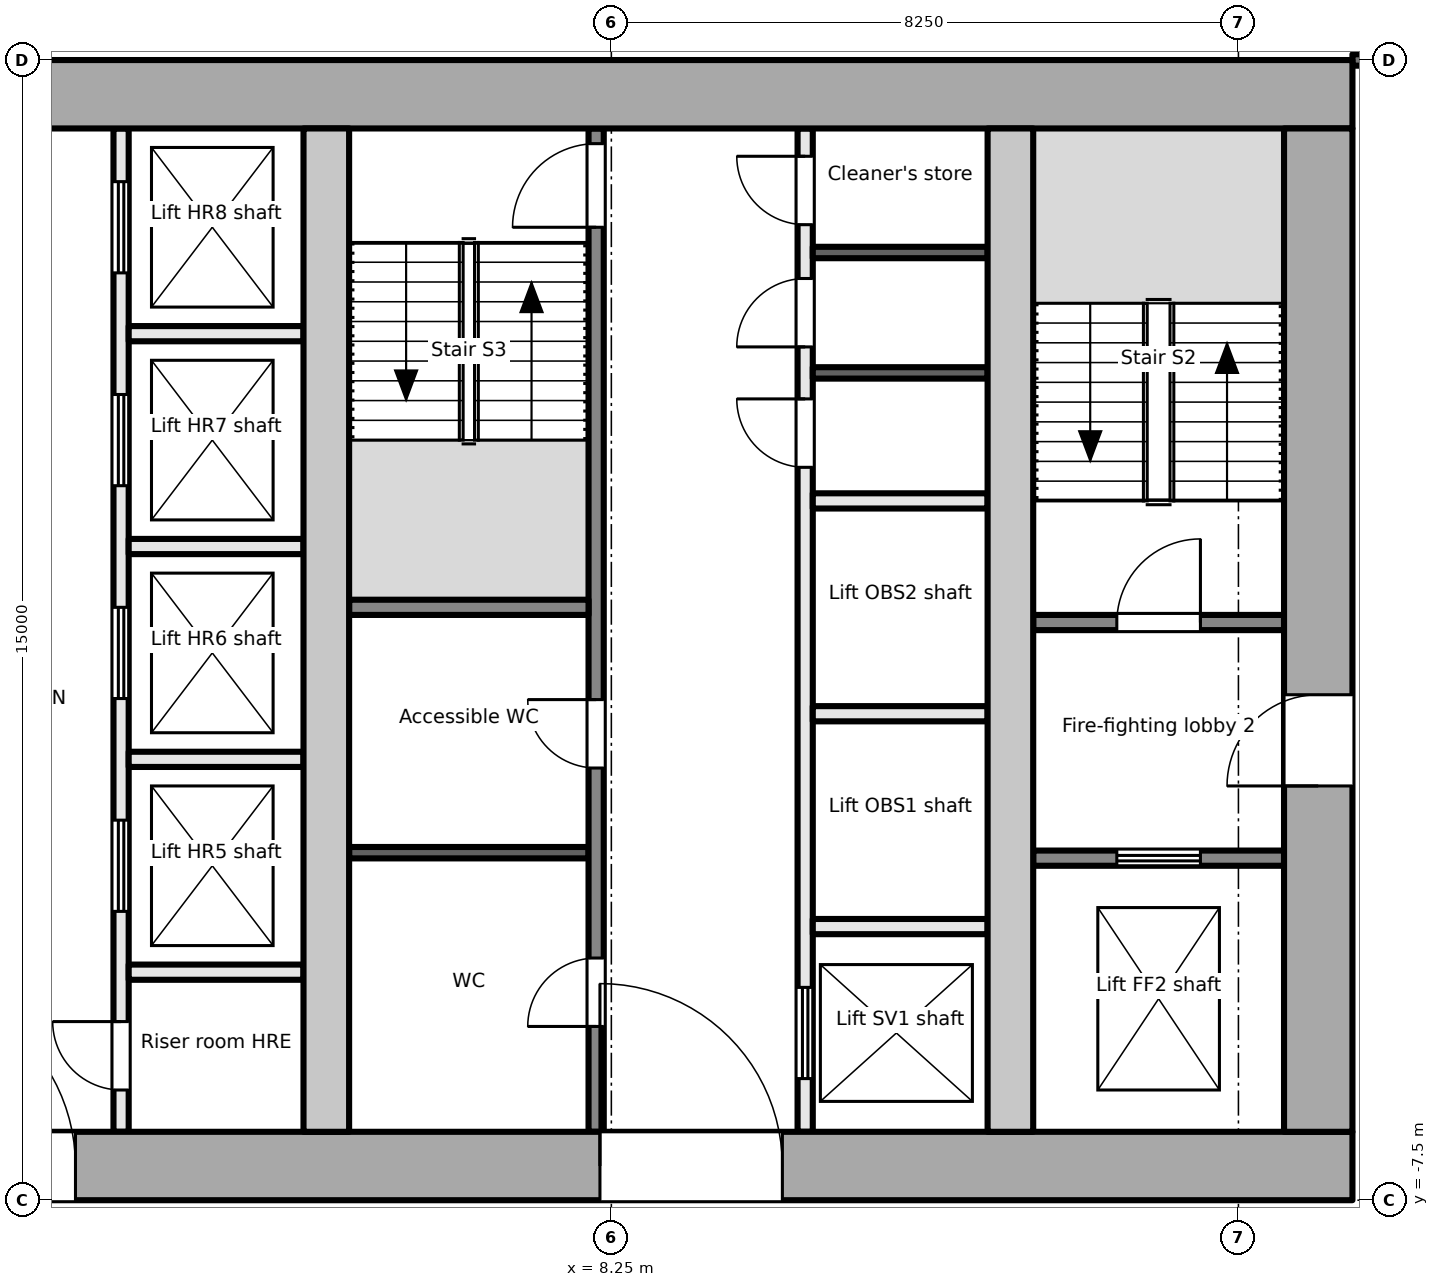
"""IFC4 building model, lengths in metres.
Left out: names, types, materials, properties, quantities, classifications, styles, units other than length and angle.
Written with IfcOpenShell. Run it as: python <this file> out.ifc"""

import sys

from ifc_helpers import new_model, si_unit, direction, frame, frame_2d, origin, place, context, subcontext, project, spatial, rectangle, extrude, element, fill, save


model = new_model("IFC4")
c1 = context("Model", 3, precision=1e-05, world=origin(), true_north=direction((0.0, 1.0)))
c2 = subcontext(c1, "Body", "Model", "MODEL_VIEW")
j1 = project(units=[si_unit("LENGTHUNIT", "METRE"), si_unit("PLANEANGLEUNIT", "RADIAN")], contexts=[c1])
p1 = place(None, origin())
s1 = spatial("IfcSite", under=j1, at=p1, CompositionType="ELEMENT")
p2 = place(p1, origin())
s2 = spatial("IfcBuilding", under=s1, at=p2, CompositionType="ELEMENT")
p3 = place(p2, frame((0.0, 0.0, 184.1)))
s3 = spatial("IfcBuildingStorey", under=s2, at=p3, CompositionType="ELEMENT", Elevation=184.1)
p4 = place(p3, frame((-18.0, -7.05, -0.2), z_axis=(0.0, 0.0, 1.0), x_axis=(1.0, 0.0, 0.0)))
e1 = element("IfcWall", 1, at=p4, inside=s3, PredefinedType="SHEAR", context=c2, shape_type="SweptSolid", body=[
    extrude(rectangle(XDim=36.0, YDim=0.9, at=frame_2d((18.0, 0.0))), origin(), (0.0, 0.0, 1.0), 3.9),
])
p5 = place(p4, frame((11.3, 0.0, 0.2)))
e2 = element("IfcOpeningElement", 2, at=p5, cuts=e1, PredefinedType="OPENING", context=c2, shape_type="SweptSolid", body=[
    extrude(rectangle(XDim=1.8, YDim=2.1, at=frame_2d((0.9, 1.05))), frame((0.0, 0.46, 0.0), z_axis=(0.0, -1.0, 0.0), x_axis=(1.0, 0.0, 0.0)), (0.0, 0.0, 1.0), 0.921),
])
p6 = place(p4, frame((16.8, 0.0, 0.2)))
e3 = element("IfcOpeningElement", 3, at=p6, cuts=e1, PredefinedType="OPENING", context=c2, shape_type="SweptSolid", body=[
    extrude(rectangle(XDim=2.4, YDim=2.1, at=frame_2d((1.2, 1.05))), frame((0.0, 0.46, 0.0), z_axis=(0.0, -1.0, 0.0), x_axis=(1.0, 0.0, 0.0)), (0.0, 0.0, 1.0), 0.921),
])
p7 = place(p4, frame((26.1, 0.0, 0.2)))
e4 = element("IfcOpeningElement", 4, at=p7, cuts=e1, PredefinedType="OPENING", context=c2, shape_type="SweptSolid", body=[
    extrude(rectangle(XDim=2.4, YDim=2.1, at=frame_2d((1.2, 1.05))), frame((0.0, 0.46, 0.0), z_axis=(0.0, -1.0, 0.0), x_axis=(1.0, 0.0, 0.0)), (0.0, 0.0, 1.0), 0.921),
])
p8 = place(p3, frame((-18.0, 7.05, -0.2), z_axis=(0.0, 0.0, 1.0), x_axis=(1.0, 0.0, 0.0)))
e5 = element("IfcWall", 5, at=p8, inside=s3, PredefinedType="SHEAR", context=c2, shape_type="SweptSolid", body=[
    extrude(rectangle(XDim=36.0, YDim=0.9, at=frame_2d((18.0, 0.0))), origin(), (0.0, 0.0, 1.0), 3.9),
])
p9 = place(p3, frame((17.55, -6.6, -0.2), z_axis=(0.0, 0.0, 1.0), x_axis=(0.0, 1.0, 0.0)))
e6 = element("IfcWall", 6, at=p9, inside=s3, PredefinedType="SHEAR", context=c2, shape_type="SweptSolid", body=[
    extrude(rectangle(XDim=13.2, YDim=0.9, at=frame_2d((6.6, 0.0))), origin(), (0.0, 0.0, 1.0), 3.9),
])
p10 = place(p9, frame((4.55, 0.0, 0.2)))
e7 = element("IfcOpeningElement", 7, at=p10, cuts=e6, PredefinedType="OPENING", context=c2, shape_type="SweptSolid", body=[
    extrude(rectangle(XDim=1.2, YDim=2.1, at=frame_2d((0.6, 1.05))), frame((0.0, 0.46, 0.0), z_axis=(0.0, -1.0, 0.0), x_axis=(1.0, 0.0, 0.0)), (0.0, 0.0, 1.0), 0.921),
])
for number, where, z_axis, x_axis in (
    (8, (4.5, -6.6, -0.2), (0.0, 0.0, 1.0), (0.0, 1.0, 0.0)),
    (9, (13.5, -6.6, -0.2), (0.0, 0.0, 1.0), (0.0, 1.0, 0.0)),
):
    element("IfcWall", number, at=place(p3, frame(where, z_axis=z_axis, x_axis=x_axis)), inside=s3, PredefinedType="SHEAR", context=c2, shape_type="SweptSolid", body=[
        extrude(rectangle(XDim=13.2, YDim=0.6, at=frame_2d((6.6, 0.0))), origin(), (0.0, 0.0, 1.0), 3.9),
    ])
p11 = place(p3, frame((13.8, -3.0, 0.0), z_axis=(0.0, 0.0, 1.0), x_axis=(1.0, 0.0, 0.0)))
e10 = element("IfcWall", 10, at=p11, inside=s3, PredefinedType="PARTITIONING", context=c2, shape_type="SweptSolid", body=[
    extrude(rectangle(XDim=3.3, YDim=0.2, at=frame_2d((1.65, 0.0))), origin(), (0.0, 0.0, 1.0), 3.7),
])
p12 = place(p11, frame((1.1, 0.0, 0.0)))
e11 = element("IfcOpeningElement", 11, at=p12, cuts=e10, PredefinedType="OPENING", context=c2, shape_type="SweptSolid", body=[
    extrude(rectangle(XDim=1.1, YDim=2.1, at=frame_2d((0.55, 1.05))), frame((0.0, 0.111, 0.0), z_axis=(0.0, -1.0, 0.0), x_axis=(1.0, 0.0, 0.0)), (0.0, 0.0, 1.0), 0.221),
])
p13 = place(p3, frame((13.8, 0.1, 0.0), z_axis=(0.0, 0.0, 1.0), x_axis=(1.0, 0.0, 0.0)))
e12 = element("IfcWall", 12, at=p13, inside=s3, PredefinedType="PARTITIONING", context=c2, shape_type="SweptSolid", body=[
    extrude(rectangle(XDim=3.3, YDim=0.2, at=frame_2d((1.65, 0.0))), origin(), (0.0, 0.0, 1.0), 3.7),
])
p14 = place(p13, frame((1.1, 0.0, 0.0)))
e13 = element("IfcOpeningElement", 13, at=p14, cuts=e12, PredefinedType="OPENING", context=c2, shape_type="SweptSolid", body=[
    extrude(rectangle(XDim=1.1, YDim=2.1, at=frame_2d((0.55, 1.05))), frame((0.0, 0.111, 0.0), z_axis=(0.0, -1.0, 0.0), x_axis=(1.0, 0.0, 0.0)), (0.0, 0.0, 1.0), 0.221),
])
p15 = place(p3, frame((1.8, -6.6, 0.0), z_axis=(0.0, 0.0, 1.0), x_axis=(0.0, 1.0, 0.0)))
e14 = element("IfcWall", 14, at=p15, inside=s3, PredefinedType="PARTITIONING", context=c2, shape_type="SweptSolid", body=[
    extrude(rectangle(XDim=13.2, YDim=0.2, at=frame_2d((6.6, 0.0))), origin(), (0.0, 0.0, 1.0), 3.7),
])
p16 = place(p15, frame((0.55, 0.0, 0.0)))
e15 = element("IfcOpeningElement", 15, at=p16, cuts=e14, PredefinedType="OPENING", context=c2, shape_type="SweptSolid", body=[
    extrude(rectangle(XDim=0.9, YDim=2.1, at=frame_2d((0.45, 1.05))), frame((0.0, 0.111, 0.0), z_axis=(0.0, -1.0, 0.0), x_axis=(1.0, 0.0, 0.0)), (0.0, 0.0, 1.0), 0.221),
])
p17 = place(p15, frame((2.9, 0.0, 0.0)))
e16 = element("IfcOpeningElement", 16, at=p17, cuts=e14, PredefinedType="OPENING", context=c2, shape_type="SweptSolid", body=[
    extrude(rectangle(XDim=1.2, YDim=2.1, at=frame_2d((0.6, 1.05))), frame((0.0, 0.111, 0.0), z_axis=(0.0, -1.0, 0.0), x_axis=(1.0, 0.0, 0.0)), (0.0, 0.0, 1.0), 0.221),
])
p18 = place(p15, frame((5.7, 0.0, 0.0)))
e17 = element("IfcOpeningElement", 17, at=p18, cuts=e14, PredefinedType="OPENING", context=c2, shape_type="SweptSolid", body=[
    extrude(rectangle(XDim=1.2, YDim=2.1, at=frame_2d((0.6, 1.05))), frame((0.0, 0.111, 0.0), z_axis=(0.0, -1.0, 0.0), x_axis=(1.0, 0.0, 0.0)), (0.0, 0.0, 1.0), 0.221),
])
p19 = place(p15, frame((8.5, 0.0, 0.0)))
e18 = element("IfcOpeningElement", 18, at=p19, cuts=e14, PredefinedType="OPENING", context=c2, shape_type="SweptSolid", body=[
    extrude(rectangle(XDim=1.2, YDim=2.1, at=frame_2d((0.6, 1.05))), frame((0.0, 0.111, 0.0), z_axis=(0.0, -1.0, 0.0), x_axis=(1.0, 0.0, 0.0)), (0.0, 0.0, 1.0), 0.221),
])
p20 = place(p15, frame((11.3, 0.0, 0.0)))
e19 = element("IfcOpeningElement", 19, at=p20, cuts=e14, PredefinedType="OPENING", context=c2, shape_type="SweptSolid", body=[
    extrude(rectangle(XDim=1.2, YDim=2.1, at=frame_2d((0.6, 1.05))), frame((0.0, 0.111, 0.0), z_axis=(0.0, -1.0, 0.0), x_axis=(1.0, 0.0, 0.0)), (0.0, 0.0, 1.0), 0.221),
])
for number, where, z_axis, x_axis in (
    (20, (1.9, -1.7, 0.0), (0.0, 0.0, 1.0), (1.0, 0.0, 0.0)),
    (21, (1.9, 1.1, 0.0), (0.0, 0.0, 1.0), (1.0, 0.0, 0.0)),
    (22, (1.9, 3.9, 0.0), (0.0, 0.0, 1.0), (1.0, 0.0, 0.0)),
    (23, (1.9, -4.5, 0.0), (0.0, 0.0, 1.0), (1.0, 0.0, 0.0)),
):
    element("IfcWall", number, at=place(p3, frame(where, z_axis=z_axis, x_axis=x_axis)), inside=s3, PredefinedType="PARTITIONING", context=c2, shape_type="SweptSolid", body=[
        extrude(rectangle(XDim=2.3, YDim=0.2, at=frame_2d((1.15, 0.0))), origin(), (0.0, 0.0, 1.0), 3.7),
    ])
p21 = place(p3, frame((8.05, -6.6, 0.0), z_axis=(0.0, 0.0, 1.0), x_axis=(0.0, 1.0, 0.0)))
e24 = element("IfcWall", 24, at=p21, inside=s3, PredefinedType="PARTITIONING", context=c2, shape_type="SweptSolid", body=[
    extrude(rectangle(XDim=13.2, YDim=0.2, at=frame_2d((6.6, 0.0))), origin(), (0.0, 0.0, 1.0), 3.7),
])
p22 = place(p21, frame((1.386, 0.0, 0.0)))
e25 = element("IfcOpeningElement", 25, at=p22, cuts=e24, PredefinedType="OPENING", context=c2, shape_type="SweptSolid", body=[
    extrude(rectangle(XDim=0.9, YDim=2.1, at=frame_2d((0.45, 1.05))), frame((0.0, 0.111, 0.0), z_axis=(0.0, -1.0, 0.0), x_axis=(1.0, 0.0, 0.0)), (0.0, 0.0, 1.0), 0.221),
])
p23 = place(p21, frame((4.786, 0.0, 0.0)))
e26 = element("IfcOpeningElement", 26, at=p23, cuts=e24, PredefinedType="OPENING", context=c2, shape_type="SweptSolid", body=[
    extrude(rectangle(XDim=0.9, YDim=2.1, at=frame_2d((0.45, 1.05))), frame((0.0, 0.111, 0.0), z_axis=(0.0, -1.0, 0.0), x_axis=(1.0, 0.0, 0.0)), (0.0, 0.0, 1.0), 0.221),
])
p24 = place(p21, frame((11.9, 0.0, 0.0)))
e27 = element("IfcOpeningElement", 27, at=p24, cuts=e24, PredefinedType="OPENING", context=c2, shape_type="SweptSolid", body=[
    extrude(rectangle(XDim=1.1, YDim=2.1, at=frame_2d((0.55, 1.05))), frame((0.0, 0.111, 0.0), z_axis=(0.0, -1.0, 0.0), x_axis=(1.0, 0.0, 0.0)), (0.0, 0.0, 1.0), 0.221),
])
p25 = place(p3, frame((10.8, -6.6, 0.0), z_axis=(0.0, 0.0, 1.0), x_axis=(0.0, 1.0, 0.0)))
e28 = element("IfcWall", 28, at=p25, inside=s3, PredefinedType="PARTITIONING", context=c2, shape_type="SweptSolid", body=[
    extrude(rectangle(XDim=13.2, YDim=0.2, at=frame_2d((6.6, 0.0))), origin(), (0.0, 0.0, 1.0), 3.7),
])
p26 = place(p25, frame((0.7, 0.0, 0.0)))
e29 = element("IfcOpeningElement", 29, at=p26, cuts=e28, PredefinedType="OPENING", context=c2, shape_type="SweptSolid", body=[
    extrude(rectangle(XDim=1.2, YDim=2.1, at=frame_2d((0.6, 1.05))), frame((0.0, 0.111, 0.0), z_axis=(0.0, -1.0, 0.0), x_axis=(1.0, 0.0, 0.0)), (0.0, 0.0, 1.0), 0.221),
])
p27 = place(p25, frame((8.742, 0.0, 0.0)))
e30 = element("IfcOpeningElement", 30, at=p27, cuts=e28, PredefinedType="OPENING", context=c2, shape_type="SweptSolid", body=[
    extrude(rectangle(XDim=0.9, YDim=2.1, at=frame_2d((0.45, 1.05))), frame((0.0, 0.111, 0.0), z_axis=(0.0, -1.0, 0.0), x_axis=(1.0, 0.0, 0.0)), (0.0, 0.0, 1.0), 0.221),
])
p28 = place(p25, frame((10.326, 0.0, 0.0)))
e31 = element("IfcOpeningElement", 31, at=p28, cuts=e28, PredefinedType="OPENING", context=c2, shape_type="SweptSolid", body=[
    extrude(rectangle(XDim=0.9, YDim=2.1, at=frame_2d((0.45, 1.05))), frame((0.0, 0.111, 0.0), z_axis=(0.0, -1.0, 0.0), x_axis=(1.0, 0.0, 0.0)), (0.0, 0.0, 1.0), 0.221),
])
p29 = place(p25, frame((11.934, 0.0, 0.0)))
e32 = element("IfcOpeningElement", 32, at=p29, cuts=e28, PredefinedType="OPENING", context=c2, shape_type="SweptSolid", body=[
    extrude(rectangle(XDim=0.9, YDim=2.1, at=frame_2d((0.45, 1.05))), frame((0.0, 0.111, 0.0), z_axis=(0.0, -1.0, 0.0), x_axis=(1.0, 0.0, 0.0)), (0.0, 0.0, 1.0), 0.221),
])
p30 = place(p3, frame((4.8, 0.3, 0.0), z_axis=(0.0, 0.0, 1.0), x_axis=(1.0, 0.0, 0.0)))
e33 = element("IfcWall", 33, at=p30, inside=s3, PredefinedType="PARTITIONING", context=c2, shape_type="SweptSolid", body=[
    extrude(rectangle(XDim=3.15, YDim=0.2, at=frame_2d((1.575, 0.0))), origin(), (0.0, 0.0, 1.0), 3.7),
])
p31 = place(p3, frame((4.8, -2.928, 0.0), z_axis=(0.0, 0.0, 1.0), x_axis=(1.0, 0.0, 0.0)))
e34 = element("IfcWall", 34, at=p31, inside=s3, PredefinedType="PARTITIONING", context=c2, shape_type="SweptSolid", body=[
    extrude(rectangle(XDim=3.15, YDim=0.15, at=frame_2d((1.575, 0.0))), origin(), (0.0, 0.0, 1.0), 3.7),
])
for number, where, z_axis, x_axis in (
    (35, (10.9, -3.9, 0.0), (0.0, 0.0, 1.0), (1.0, 0.0, 0.0)),
    (36, (10.9, -1.1, 0.0), (0.0, 0.0, 1.0), (1.0, 0.0, 0.0)),
    (37, (10.9, 1.7, 0.0), (0.0, 0.0, 1.0), (1.0, 0.0, 0.0)),
):
    element("IfcWall", number, at=place(p3, frame(where, z_axis=z_axis, x_axis=x_axis)), inside=s3, PredefinedType="PARTITIONING", context=c2, shape_type="SweptSolid", body=[
        extrude(rectangle(XDim=2.3, YDim=0.2, at=frame_2d((1.15, 0.0))), origin(), (0.0, 0.0, 1.0), 3.7),
    ])
for number, where, z_axis, x_axis in (
    (38, (10.9, 3.384, 0.0), (0.0, 0.0, 1.0), (1.0, 0.0, 0.0)),
    (39, (10.9, 4.968, 0.0), (0.0, 0.0, 1.0), (1.0, 0.0, 0.0)),
):
    element("IfcWall", number, at=place(p3, frame(where, z_axis=z_axis, x_axis=x_axis)), inside=s3, PredefinedType="PARTITIONING", context=c2, shape_type="SweptSolid", body=[
        extrude(rectangle(XDim=2.3, YDim=0.15, at=frame_2d((1.15, 0.0))), origin(), (0.0, 0.0, 1.0), 3.7),
    ])
p32 = place(p3, frame((18.0, 7.501, 0.0), z_axis=(0.0, 0.0, 1.0), x_axis=(1.0, 0.0, 0.0)))
e40 = element("IfcWall", 40, at=p32, inside=s3, PredefinedType="PARTITIONING", context=c2, shape_type="SweptSolid", body=[
    extrude(rectangle(XDim=2.624, YDim=0.15, at=frame_2d((1.312, 0.0))), origin(), (0.0, 0.0, 1.0), 3.7),
])
p33 = place(p12, origin())
e41 = element("IfcDoor", 41, at=p33, inside=s3, OperationType="DOUBLE_DOOR_SLIDING", PredefinedType="DOOR", context=c2, shape_type="SweptSolid", body=[
    extrude(rectangle(XDim=1.1, YDim=2.1, at=frame_2d((0.55, 1.05))), frame((0.0, 0.025, 0.0), z_axis=(0.0, -1.0, 0.0), x_axis=(1.0, 0.0, 0.0)), (0.0, 0.0, 1.0), 0.05),
])
fill(e11, e41)
p34 = place(p10, origin())
e42 = element("IfcDoor", 42, at=p34, inside=s3, OperationType="SINGLE_SWING_LEFT", PredefinedType="DOOR", context=c2, shape_type="SweptSolid", body=[
    extrude(rectangle(XDim=1.2, YDim=2.1, at=frame_2d((0.6, 1.05))), frame((0.0, 0.025, 0.0), z_axis=(0.0, -1.0, 0.0), x_axis=(1.0, 0.0, 0.0)), (0.0, 0.0, 1.0), 0.05),
])
fill(e7, e42)
p35 = place(p14, origin())
e43 = element("IfcDoor", 43, at=p35, inside=s3, OperationType="SINGLE_SWING_RIGHT", PredefinedType="DOOR", context=c2, shape_type="SweptSolid", body=[
    extrude(rectangle(XDim=1.1, YDim=2.1, at=frame_2d((0.55, 1.05))), frame((0.0, 0.025, 0.0), z_axis=(0.0, -1.0, 0.0), x_axis=(1.0, 0.0, 0.0)), (0.0, 0.0, 1.0), 0.05),
])
fill(e13, e43)
p36 = place(p16, origin())
e44 = element("IfcDoor", 44, at=p36, inside=s3, OperationType="SINGLE_SWING_RIGHT", PredefinedType="DOOR", context=c2, shape_type="SweptSolid", body=[
    extrude(rectangle(XDim=0.9, YDim=2.1, at=frame_2d((0.45, 1.05))), frame((0.0, 0.025, 0.0), z_axis=(0.0, -1.0, 0.0), x_axis=(1.0, 0.0, 0.0)), (0.0, 0.0, 1.0), 0.05),
])
fill(e15, e44)
p37 = place(p17, origin())
e45 = element("IfcDoor", 45, at=p37, inside=s3, OperationType="DOUBLE_DOOR_SLIDING", PredefinedType="DOOR", context=c2, shape_type="SweptSolid", body=[
    extrude(rectangle(XDim=1.2, YDim=2.1, at=frame_2d((0.6, 1.05))), frame((0.0, 0.025, 0.0), z_axis=(0.0, -1.0, 0.0), x_axis=(1.0, 0.0, 0.0)), (0.0, 0.0, 1.0), 0.05),
])
fill(e16, e45)
p38 = place(p18, origin())
e46 = element("IfcDoor", 46, at=p38, inside=s3, OperationType="DOUBLE_DOOR_SLIDING", PredefinedType="DOOR", context=c2, shape_type="SweptSolid", body=[
    extrude(rectangle(XDim=1.2, YDim=2.1, at=frame_2d((0.6, 1.05))), frame((0.0, 0.025, 0.0), z_axis=(0.0, -1.0, 0.0), x_axis=(1.0, 0.0, 0.0)), (0.0, 0.0, 1.0), 0.05),
])
fill(e17, e46)
p39 = place(p19, origin())
e47 = element("IfcDoor", 47, at=p39, inside=s3, OperationType="DOUBLE_DOOR_SLIDING", PredefinedType="DOOR", context=c2, shape_type="SweptSolid", body=[
    extrude(rectangle(XDim=1.2, YDim=2.1, at=frame_2d((0.6, 1.05))), frame((0.0, 0.025, 0.0), z_axis=(0.0, -1.0, 0.0), x_axis=(1.0, 0.0, 0.0)), (0.0, 0.0, 1.0), 0.05),
])
fill(e18, e47)
p40 = place(p20, origin())
e48 = element("IfcDoor", 48, at=p40, inside=s3, OperationType="DOUBLE_DOOR_SLIDING", PredefinedType="DOOR", context=c2, shape_type="SweptSolid", body=[
    extrude(rectangle(XDim=1.2, YDim=2.1, at=frame_2d((0.6, 1.05))), frame((0.0, 0.025, 0.0), z_axis=(0.0, -1.0, 0.0), x_axis=(1.0, 0.0, 0.0)), (0.0, 0.0, 1.0), 0.05),
])
fill(e19, e48)
p41 = place(p6, origin())
e49 = element("IfcDoor", 49, at=p41, inside=s3, OperationType="DOUBLE_DOOR_DOUBLE_SWING", PredefinedType="DOOR", context=c2, shape_type="SweptSolid", body=[
    extrude(rectangle(XDim=2.4, YDim=2.1, at=frame_2d((1.2, 1.05))), frame((0.0, 0.025, 0.0), z_axis=(0.0, -1.0, 0.0), x_axis=(1.0, 0.0, 0.0)), (0.0, 0.0, 1.0), 0.05),
])
fill(e3, e49)
p42 = place(p22, origin())
e50 = element("IfcDoor", 50, at=p42, inside=s3, OperationType="SINGLE_SWING_LEFT", PredefinedType="DOOR", context=c2, shape_type="SweptSolid", body=[
    extrude(rectangle(XDim=0.9, YDim=2.1, at=frame_2d((0.45, 1.05))), frame((0.0, 0.025, 0.0), z_axis=(0.0, -1.0, 0.0), x_axis=(1.0, 0.0, 0.0)), (0.0, 0.0, 1.0), 0.05),
])
fill(e25, e50)
p43 = place(p23, origin())
e51 = element("IfcDoor", 51, at=p43, inside=s3, OperationType="SINGLE_SWING_RIGHT", PredefinedType="DOOR", context=c2, shape_type="SweptSolid", body=[
    extrude(rectangle(XDim=0.9, YDim=2.1, at=frame_2d((0.45, 1.05))), frame((0.0, 0.025, 0.0), z_axis=(0.0, -1.0, 0.0), x_axis=(1.0, 0.0, 0.0)), (0.0, 0.0, 1.0), 0.05),
])
fill(e26, e51)
p44 = place(p24, origin())
e52 = element("IfcDoor", 52, at=p44, inside=s3, OperationType="SINGLE_SWING_LEFT", PredefinedType="DOOR", context=c2, shape_type="SweptSolid", body=[
    extrude(rectangle(XDim=1.1, YDim=2.1, at=frame_2d((0.55, 1.05))), frame((0.0, 0.025, 0.0), z_axis=(0.0, -1.0, 0.0), x_axis=(1.0, 0.0, 0.0)), (0.0, 0.0, 1.0), 0.05),
])
fill(e27, e52)
p45 = place(p7, origin())
e53 = element("IfcDoor", 53, at=p45, inside=s3, OperationType="DOUBLE_DOOR_DOUBLE_SWING", PredefinedType="DOOR", context=c2, shape_type="SweptSolid", body=[
    extrude(rectangle(XDim=2.4, YDim=2.1, at=frame_2d((1.2, 1.05))), frame((0.0, 0.025, 0.0), z_axis=(0.0, -1.0, 0.0), x_axis=(1.0, 0.0, 0.0)), (0.0, 0.0, 1.0), 0.05),
])
fill(e4, e53)
p46 = place(p26, origin())
e54 = element("IfcDoor", 54, at=p46, inside=s3, OperationType="DOUBLE_DOOR_SLIDING", PredefinedType="DOOR", context=c2, shape_type="SweptSolid", body=[
    extrude(rectangle(XDim=1.2, YDim=2.1, at=frame_2d((0.6, 1.05))), frame((0.0, 0.025, 0.0), z_axis=(0.0, -1.0, 0.0), x_axis=(1.0, 0.0, 0.0)), (0.0, 0.0, 1.0), 0.05),
])
fill(e29, e54)
p47 = place(p27, origin())
e55 = element("IfcDoor", 55, at=p47, inside=s3, OperationType="SINGLE_SWING_RIGHT", PredefinedType="DOOR", context=c2, shape_type="SweptSolid", body=[
    extrude(rectangle(XDim=0.9, YDim=2.1, at=frame_2d((0.45, 1.05))), frame((0.0, 0.025, 0.0), z_axis=(0.0, -1.0, 0.0), x_axis=(1.0, 0.0, 0.0)), (0.0, 0.0, 1.0), 0.05),
])
fill(e30, e55)
p48 = place(p28, origin())
e56 = element("IfcDoor", 56, at=p48, inside=s3, OperationType="SINGLE_SWING_LEFT", PredefinedType="DOOR", context=c2, shape_type="SweptSolid", body=[
    extrude(rectangle(XDim=0.9, YDim=2.1, at=frame_2d((0.45, 1.05))), frame((0.0, 0.025, 0.0), z_axis=(0.0, -1.0, 0.0), x_axis=(1.0, 0.0, 0.0)), (0.0, 0.0, 1.0), 0.05),
])
fill(e31, e56)
p49 = place(p29, origin())
e57 = element("IfcDoor", 57, at=p49, inside=s3, OperationType="SINGLE_SWING_RIGHT", PredefinedType="DOOR", context=c2, shape_type="SweptSolid", body=[
    extrude(rectangle(XDim=0.9, YDim=2.1, at=frame_2d((0.45, 1.05))), frame((0.0, 0.025, 0.0), z_axis=(0.0, -1.0, 0.0), x_axis=(1.0, 0.0, 0.0)), (0.0, 0.0, 1.0), 0.05),
])
fill(e32, e57)
save(model, sys.argv[1])
